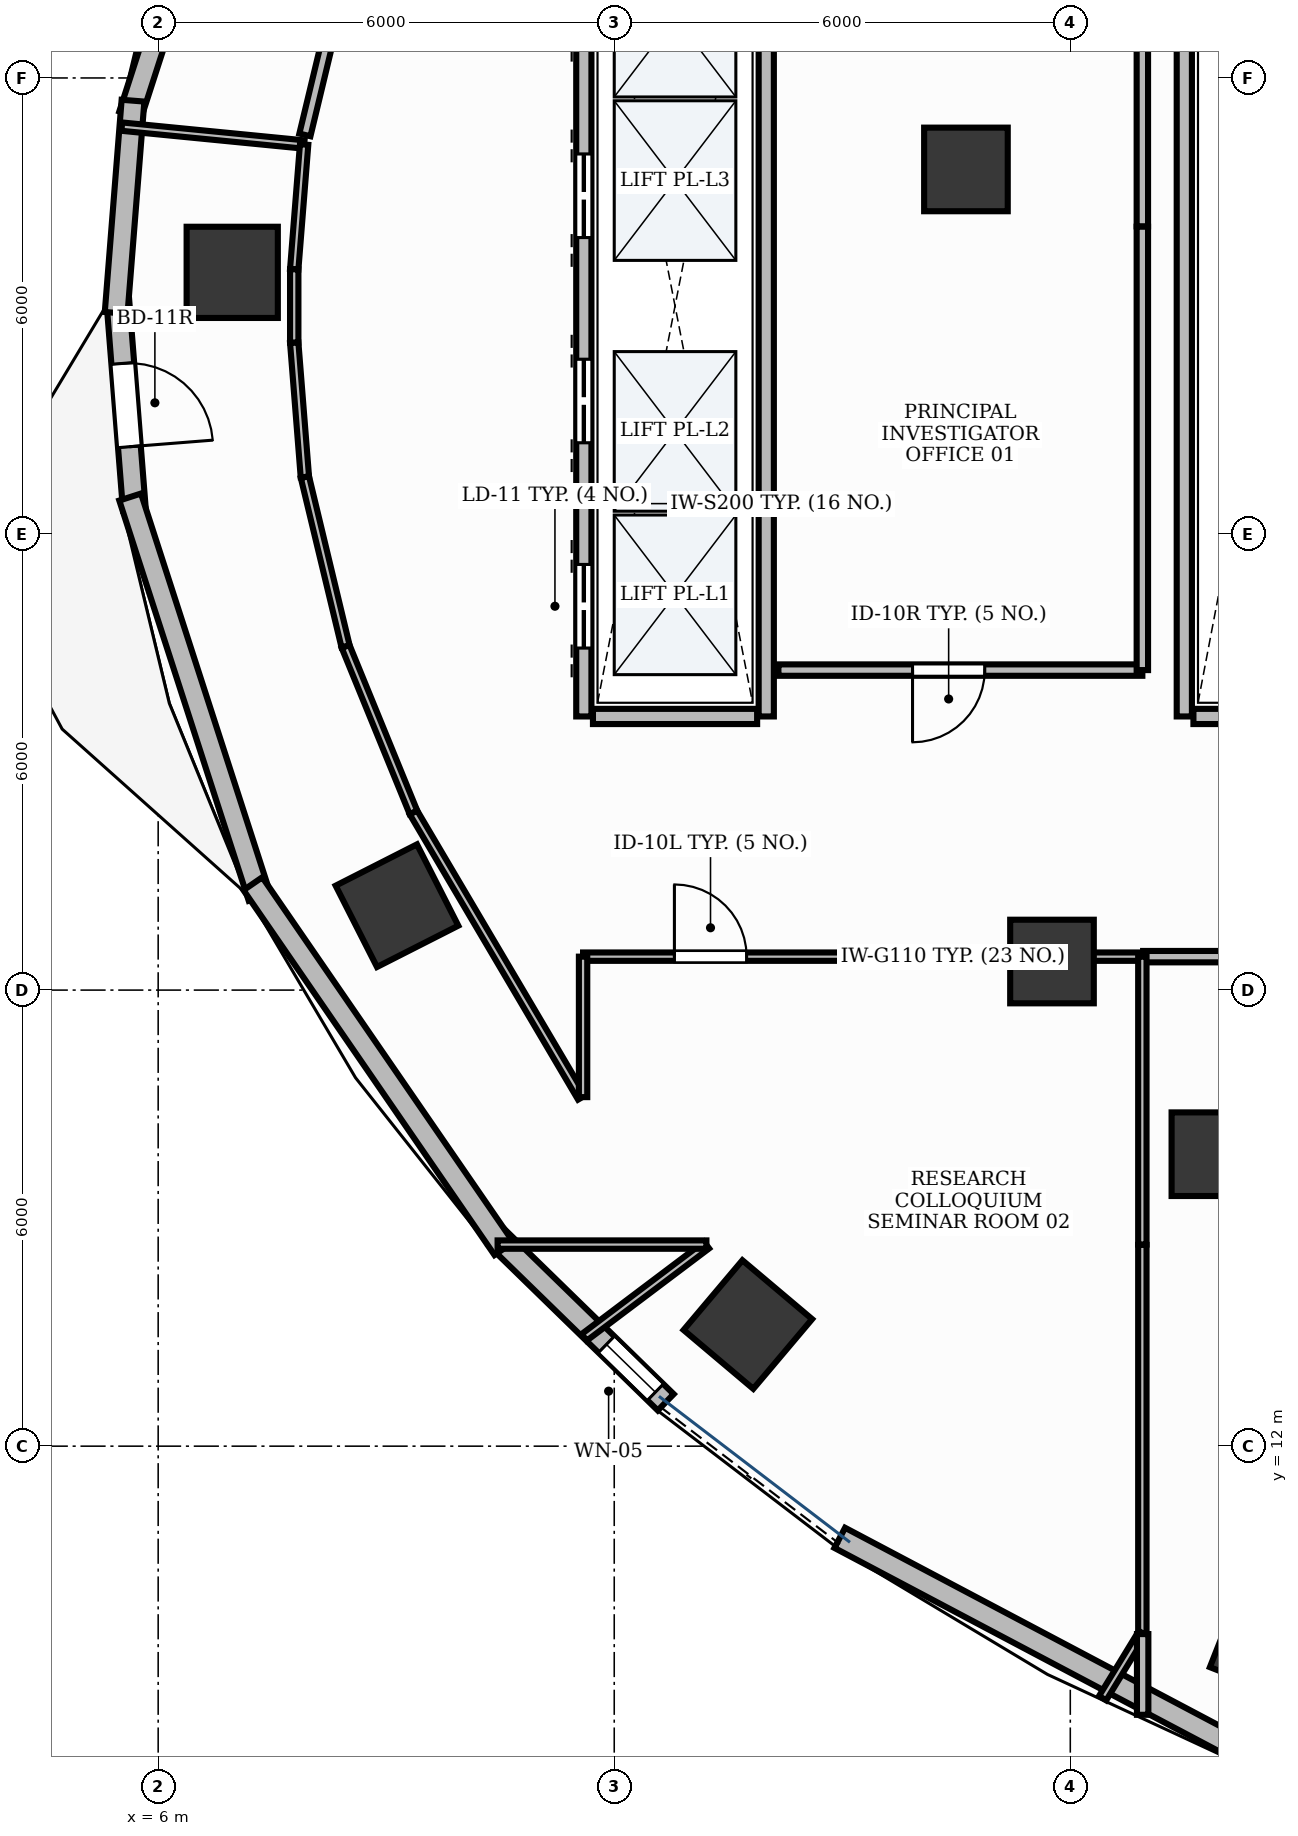
"""IFC4 building model, lengths in metres.
Left out: names, types, materials, properties, quantities, classifications, styles, units other than length and angle.
Written with IfcOpenShell. Run it as: python <this file> out.ifc"""

import sys

from ifc_helpers import new_model, si_unit, direction, frame, frame_2d, origin, origin_2d, place, context, subcontext, project, spatial, rectangle, extrude, element, fill, save


model = new_model("IFC4")
c1 = context("Model", 3, precision=1e-05, world=origin(), true_north=direction((0.0, 1.0)))
c2 = subcontext(c1, "Body", "Model", "MODEL_VIEW")
j1 = project(units=[si_unit("LENGTHUNIT", "METRE"), si_unit("PLANEANGLEUNIT", "RADIAN")], contexts=[c1])
p1 = place(None, origin())
s1 = spatial("IfcSite", under=j1, at=p1, CompositionType="ELEMENT")
p2 = place(p1, origin())
s2 = spatial("IfcBuilding", under=s1, at=p2, CompositionType="ELEMENT")
p3 = place(p2, frame((0.0, 0.0, 140.4)))
s3 = spatial("IfcBuildingStorey", under=s2, at=p3, CompositionType="ELEMENT", Elevation=140.4)
p4 = place(p3, frame((6.974, 27.442, -0.0), z_axis=(0.0, 0.0, 1.0), x_axis=(0.0, 1.0, 0.0)))
e1 = element("IfcColumn", 1, at=p4, inside=s3, PredefinedType="COLUMN", context=c2, shape_type="SweptSolid", body=[
    extrude(rectangle(XDim=1.2, YDim=1.2, at=origin_2d()), origin(), (0.0, 0.0, 1.0), 3.901),
])
p5 = place(p3, frame((16.627, 28.797, -0.0), z_axis=(0.0, 0.0, 1.0), x_axis=(1.0, 0.0, 0.0)))
e2 = element("IfcColumn", 2, at=p5, inside=s3, PredefinedType="COLUMN", context=c2, shape_type="SweptSolid", body=[
    extrude(rectangle(XDim=1.1, YDim=1.1, at=origin_2d()), origin(), (0.0, 0.0, 1.0), 3.901),
])
p6 = place(p3, frame((9.142, 19.111, -0.0), z_axis=(0.0, 0.0, 1.0), x_axis=(-0.453057191132, 0.891481453292, 0.0)))
e3 = element("IfcColumn", 3, at=p6, inside=s3, PredefinedType="COLUMN", context=c2, shape_type="SweptSolid", body=[
    extrude(rectangle(XDim=1.2, YDim=1.2, at=origin_2d()), origin(), (0.0, 0.0, 1.0), 3.901),
])
p7 = place(p3, frame((17.759, 18.376, -0.0), z_axis=(0.0, 0.0, 1.0), x_axis=(1.0, 0.0, 0.0)))
e4 = element("IfcColumn", 4, at=p7, inside=s3, PredefinedType="COLUMN", context=c2, shape_type="SweptSolid", body=[
    extrude(rectangle(XDim=1.1, YDim=1.1, at=origin_2d()), origin(), (0.0, 0.0, 1.0), 3.901),
])
p8 = place(p3, frame((13.758, 13.6, -0.0), z_axis=(0.0, 0.0, 1.0), x_axis=(-0.764246456939, 0.644924300253, 0.0)))
e5 = element("IfcColumn", 5, at=p8, inside=s3, PredefinedType="COLUMN", context=c2, shape_type="SweptSolid", body=[
    extrude(rectangle(XDim=1.2, YDim=1.2, at=origin_2d()), origin(), (0.0, 0.0, 1.0), 3.901),
])
p9 = place(p3, frame((19.883, 15.841, -0.0), z_axis=(0.0, 0.0, 1.0), x_axis=(1.0, 0.0, 0.0)))
e6 = element("IfcColumn", 6, at=p9, inside=s3, PredefinedType="COLUMN", context=c2, shape_type="SweptSolid", body=[
    extrude(rectangle(XDim=1.1, YDim=1.1, at=origin_2d()), origin(), (0.0, 0.0, 1.0), 3.901),
])
p10 = place(p3, frame((20.615, 9.431, -0.0), z_axis=(0.0, 0.0, 1.0), x_axis=(-0.930225540858, 0.366988341962, 0.0)))
e7 = element("IfcColumn", 7, at=p10, inside=s3, PredefinedType="COLUMN", context=c2, shape_type="SweptSolid", body=[
    extrude(rectangle(XDim=1.2, YDim=1.2, at=origin_2d()), origin(), (0.0, 0.0, 1.0), 3.901),
])
p11 = place(p3, frame((5.469, 27.073, 0.0), z_axis=(0.0, 0.0, 1.0), x_axis=(0.079056321743, -0.996870151019, 0.0)))
e8 = element("IfcWall", 8, at=p11, inside=s3, PredefinedType="STANDARD", context=c2, shape_type="SweptSolid", body=[
    extrude(rectangle(XDim=2.761, YDim=0.3, at=frame_2d((1.38, 0.0))), origin(), (0.0, 0.0, 1.0), 3.9),
])
p12 = place(p11, frame((0.83, 0.0, 0.0)))
e9 = element("IfcOpeningElement", 9, at=p12, cuts=e8, PredefinedType="OPENING", context=c2, shape_type="SweptSolid", body=[
    extrude(rectangle(XDim=1.1, YDim=2.15, at=frame_2d((0.55, 1.075))), frame((0.0, 0.165, 0.0), z_axis=(0.0, -1.0, 0.0), x_axis=(1.0, 0.0, 0.0)), (0.0, 0.0, 1.0), 0.33),
])
p13 = place(p3, frame((10.456, 14.743, 0.0), z_axis=(0.0, 0.0, 1.0), x_axis=(0.716099460419, -0.697998254144, 0.0)))
e10 = element("IfcWall", 10, at=p13, inside=s3, PredefinedType="STANDARD", context=c2, shape_type="SweptSolid", body=[
    extrude(rectangle(XDim=3.102, YDim=0.3, at=frame_2d((1.551, 0.0))), origin(), (0.0, 0.0, 1.0), 3.9),
])
p14 = place(p13, frame((2.012, 0.0, 0.95)))
e11 = element("IfcOpeningElement", 11, at=p14, cuts=e10, PredefinedType="OPENING", context=c2, shape_type="SweptSolid", body=[
    extrude(rectangle(XDim=0.9, YDim=1.8, at=frame_2d((0.45, 0.9))), frame((0.0, 0.165, 0.0), z_axis=(0.0, -1.0, 0.0), x_axis=(1.0, 0.0, 0.0)), (0.0, 0.0, 1.0), 0.33),
])
p15 = place(p3, frame((7.334, 34.779, 0.0), z_axis=(0.0, 0.0, 1.0), x_axis=(-0.307599470659, -0.951515930319, 0.0)))
e12 = element("IfcWall", 12, at=p15, inside=s3, PredefinedType="STANDARD", context=c2, shape_type="SweptSolid", body=[
    extrude(rectangle(XDim=5.534, YDim=0.3, at=frame_2d((2.767, 0.0))), origin(), (0.0, 0.0, 1.0), 3.47),
])
p16 = place(p3, frame((5.669, 29.701, 0.0), z_axis=(0.0, 0.0, 1.0), x_axis=(-0.079062676622, -0.996869647028, 0.0)))
e13 = element("IfcWall", 13, at=p16, inside=s3, PredefinedType="STANDARD", context=c2, shape_type="SweptSolid", body=[
    extrude(rectangle(XDim=2.801, YDim=0.3, at=frame_2d((1.4, 0.0))), origin(), (0.0, 0.0, 1.0), 3.47),
])
p17 = place(p3, frame((5.632, 24.487, 0.0), z_axis=(0.0, 0.0, 1.0), x_axis=(0.307599470659, -0.951515930319, 0.0)))
e14 = element("IfcWall", 14, at=p17, inside=s3, PredefinedType="STANDARD", context=c2, shape_type="SweptSolid", body=[
    extrude(rectangle(XDim=5.534, YDim=0.3, at=frame_2d((2.767, 0.0))), origin(), (0.0, 0.0, 1.0), 3.9),
])
p18 = place(p3, frame((7.246, 19.399, 0.0), z_axis=(0.0, 0.0, 1.0), x_axis=(0.566825798999, -0.823837674296, 0.0)))
e15 = element("IfcWall", 15, at=p18, inside=s3, PredefinedType="STANDARD", context=c2, shape_type="SweptSolid", body=[
    extrude(rectangle(XDim=5.826, YDim=0.3, at=frame_2d((2.913, 0.0))), origin(), (0.0, 0.0, 1.0), 3.9),
])
p19 = place(p3, frame((14.967, 10.794, 0.0), z_axis=(0.0, 0.0, 1.0), x_axis=(0.883986649445, -0.467512142734, 0.0)))
e16 = element("IfcWall", 16, at=p19, inside=s3, PredefinedType="STANDARD", context=c2, shape_type="SweptSolid", body=[
    extrude(rectangle(XDim=6.601, YDim=0.3, at=frame_2d((3.301, 0.0))), origin(), (0.0, 0.0, 1.0), 3.9),
])
p20 = place(p3, frame((11.6, 21.6, 0.0), z_axis=(0.0, 0.0, 1.0), x_axis=(0.0, 1.0, 0.0)))
e17 = element("IfcWall", 17, at=p20, inside=s3, PredefinedType="PARTITIONING", context=c2, shape_type="SweptSolid", body=[
    extrude(rectangle(XDim=10.8, YDim=0.2, at=frame_2d((5.4, 0.0))), origin(), (0.0, 0.0, 1.0), 2.91),
])
p21 = place(p20, frame((0.9, 0.0, 0.0)))
e18 = element("IfcOpeningElement", 18, at=p21, cuts=e17, PredefinedType="OPENING", context=c2, shape_type="SweptSolid", body=[
    extrude(rectangle(XDim=1.1, YDim=2.2, at=frame_2d((0.55, 1.1))), frame((0.0, 0.115, 0.0), z_axis=(0.0, -1.0, 0.0), x_axis=(1.0, 0.0, 0.0)), (0.0, 0.0, 1.0), 0.23),
])
p22 = place(p20, frame((3.6, 0.0, 0.0)))
e19 = element("IfcOpeningElement", 19, at=p22, cuts=e17, PredefinedType="OPENING", context=c2, shape_type="SweptSolid", body=[
    extrude(rectangle(XDim=1.1, YDim=2.2, at=frame_2d((0.55, 1.1))), frame((0.0, 0.115, 0.0), z_axis=(0.0, -1.0, 0.0), x_axis=(1.0, 0.0, 0.0)), (0.0, 0.0, 1.0), 0.23),
])
p23 = place(p20, frame((6.3, 0.0, 0.0)))
e20 = element("IfcOpeningElement", 20, at=p23, cuts=e17, PredefinedType="OPENING", context=c2, shape_type="SweptSolid", body=[
    extrude(rectangle(XDim=1.1, YDim=2.2, at=frame_2d((0.55, 1.1))), frame((0.0, 0.115, 0.0), z_axis=(0.0, -1.0, 0.0), x_axis=(1.0, 0.0, 0.0)), (0.0, 0.0, 1.0), 0.23),
])
p24 = place(p20, frame((9.0, 0.0, 0.0)))
e21 = element("IfcOpeningElement", 21, at=p24, cuts=e17, PredefinedType="OPENING", context=c2, shape_type="SweptSolid", body=[
    extrude(rectangle(XDim=1.1, YDim=2.2, at=frame_2d((0.55, 1.1))), frame((0.0, 0.115, 0.0), z_axis=(0.0, -1.0, 0.0), x_axis=(1.0, 0.0, 0.0)), (0.0, 0.0, 1.0), 0.23),
])
p25 = place(p3, frame((14.0, 21.6, 0.0), z_axis=(0.0, 0.0, 1.0), x_axis=(0.0, 1.0, 0.0)))
e22 = element("IfcWall", 22, at=p25, inside=s3, PredefinedType="PARTITIONING", context=c2, shape_type="SweptSolid", body=[
    extrude(rectangle(XDim=10.8, YDim=0.2, at=frame_2d((5.4, 0.0))), origin(), (0.0, 0.0, 1.0), 2.91),
])
p26 = place(p3, frame((11.72, 21.6, 0.0), z_axis=(0.0, 0.0, 1.0), x_axis=(1.0, 0.0, 0.0)))
e23 = element("IfcWall", 23, at=p26, inside=s3, PredefinedType="PARTITIONING", context=c2, shape_type="SweptSolid", body=[
    extrude(rectangle(XDim=2.16, YDim=0.2, at=frame_2d((1.08, 0.0))), origin(), (0.0, 0.0, 1.0), 2.91),
])
p27 = place(p3, frame((19.5, 21.6, 0.0), z_axis=(0.0, 0.0, 1.0), x_axis=(0.0, 1.0, 0.0)))
e24 = element("IfcWall", 24, at=p27, inside=s3, PredefinedType="PARTITIONING", context=c2, shape_type="SweptSolid", body=[
    extrude(rectangle(XDim=10.8, YDim=0.2, at=frame_2d((5.4, 0.0))), origin(), (0.0, 0.0, 1.0), 2.91),
])
p28 = place(p3, frame((19.62, 21.6, 0.0), z_axis=(0.0, 0.0, 1.0), x_axis=(1.0, 0.0, 0.0)))
e25 = element("IfcWall", 25, at=p28, inside=s3, PredefinedType="PARTITIONING", context=c2, shape_type="SweptSolid", body=[
    extrude(rectangle(XDim=2.11, YDim=0.2, at=frame_2d((1.055, 0.0))), origin(), (0.0, 0.0, 1.0), 2.91),
])
p29 = place(p3, frame((18.948, 22.21, 0.0), z_axis=(0.0, 0.0, 1.0), x_axis=(-1.0, 0.0, 0.0)))
e26 = element("IfcWall", 26, at=p29, inside=s3, PredefinedType="PARTITIONING", context=c2, shape_type="SweptSolid", body=[
    extrude(rectangle(XDim=4.788, YDim=0.15, at=frame_2d((2.394, 0.0))), origin(), (0.0, 0.0, 1.0), 2.91),
])
p30 = place(p29, frame((2.073, 0.0, 0.0)))
e27 = element("IfcOpeningElement", 27, at=p30, cuts=e26, PredefinedType="OPENING", context=c2, shape_type="SweptSolid", body=[
    extrude(rectangle(XDim=0.95, YDim=2.15, at=frame_2d((0.475, 1.075))), frame((0.0, 0.09, 0.0), z_axis=(0.0, -1.0, 0.0), x_axis=(1.0, 0.0, 0.0)), (0.0, 0.0, 1.0), 0.18),
])
p31 = place(p3, frame((11.59, 18.44, 0.0), z_axis=(0.0, 0.0, 1.0), x_axis=(1.0, 0.0, 0.0)))
e28 = element("IfcWall", 28, at=p31, inside=s3, PredefinedType="MOVABLE", context=c2, shape_type="SweptSolid", body=[
    extrude(rectangle(XDim=7.358, YDim=0.11, at=frame_2d((3.679, 0.0))), origin(), (0.0, 0.0, 1.0), 2.91),
])
p32 = place(p31, frame((1.202, 0.0, 0.0)))
e29 = element("IfcOpeningElement", 29, at=p32, cuts=e28, PredefinedType="OPENING", context=c2, shape_type="SweptSolid", body=[
    extrude(rectangle(XDim=0.95, YDim=2.15, at=frame_2d((0.475, 1.075))), frame((0.0, 0.07, 0.0), z_axis=(0.0, -1.0, 0.0), x_axis=(1.0, 0.0, 0.0)), (0.0, 0.0, 1.0), 0.14),
])
p33 = place(p3, frame((18.958, 18.44, 0.0), z_axis=(0.0, 0.0, 1.0), x_axis=(1.0, 0.0, 0.0)))
e30 = element("IfcWall", 30, at=p33, inside=s3, PredefinedType="PARTITIONING", context=c2, shape_type="SweptSolid", body=[
    extrude(rectangle(XDim=4.532, YDim=0.15, at=frame_2d((2.266, 0.0))), origin(), (0.0, 0.0, 1.0), 2.91),
])
p34 = place(p33, frame((1.672, 0.0, 0.0)))
e31 = element("IfcOpeningElement", 31, at=p34, cuts=e30, PredefinedType="OPENING", context=c2, shape_type="SweptSolid", body=[
    extrude(rectangle(XDim=0.95, YDim=2.15, at=frame_2d((0.475, 1.075))), frame((0.0, 0.09, 0.0), z_axis=(0.0, -1.0, 0.0), x_axis=(1.0, 0.0, 0.0)), (0.0, 0.0, 1.0), 0.18),
])
p35 = place(p3, frame((18.948, 30.848, 0.0), z_axis=(0.0, 0.0, 1.0), x_axis=(0.0, -1.0, 0.0)))
e32 = element("IfcWall", 32, at=p35, inside=s3, PredefinedType="PARTITIONING", context=c2, shape_type="SweptSolid", body=[
    extrude(rectangle(XDim=2.801, YDim=0.15, at=frame_2d((1.4, 0.0))), origin(), (0.0, 0.0, 1.0), 2.91),
])
p36 = place(p3, frame((18.948, 28.043, 0.0), z_axis=(0.0, 0.0, 1.0), x_axis=(0.0, -1.0, 0.0)))
e33 = element("IfcWall", 33, at=p36, inside=s3, PredefinedType="PARTITIONING", context=c2, shape_type="SweptSolid", body=[
    extrude(rectangle(XDim=5.833, YDim=0.15, at=frame_2d((2.917, 0.0))), origin(), (0.0, 0.0, 1.0), 2.91),
])
p37 = place(p3, frame((5.521, 29.36, 0.0), z_axis=(0.0, 0.0, 1.0), x_axis=(0.99523083929, -0.097547816614, 0.0)))
e34 = element("IfcWall", 34, at=p37, inside=s3, PredefinedType="MOVABLE", context=c2, shape_type="SweptSolid", body=[
    extrude(rectangle(XDim=2.41, YDim=0.11, at=frame_2d((1.205, 0.0))), origin(), (0.0, 0.0, 1.0), 2.91),
])
p38 = place(p3, frame((7.92, 29.125, 0.0), z_axis=(0.0, 0.0, 1.0), x_axis=(-0.079067162534, -0.996869291236, 0.0)))
e35 = element("IfcWall", 35, at=p38, inside=s3, PredefinedType="MOVABLE", context=c2, shape_type="SweptSolid", body=[
    extrude(rectangle(XDim=1.646, YDim=0.11, at=frame_2d((0.823, 0.0))), origin(), (0.0, 0.0, 1.0), 2.91),
])
p39 = place(p3, frame((7.79, 27.483, 0.0), z_axis=(0.0, 0.0, 1.0), x_axis=(0.0, -1.0, 0.0)))
e36 = element("IfcWall", 36, at=p39, inside=s3, PredefinedType="MOVABLE", context=c2, shape_type="SweptSolid", body=[
    extrude(rectangle(XDim=0.966, YDim=0.11, at=frame_2d((0.483, 0.0))), origin(), (0.0, 0.0, 1.0), 2.91),
])
p40 = place(p3, frame((7.79, 26.516, 0.0), z_axis=(0.0, 0.0, 1.0), x_axis=(0.079131522864, -0.996864184375, 0.0)))
e37 = element("IfcWall", 37, at=p40, inside=s3, PredefinedType="MOVABLE", context=c2, shape_type="SweptSolid", body=[
    extrude(rectangle(XDim=1.771, YDim=0.11, at=frame_2d((0.885, 0.0))), origin(), (0.0, 0.0, 1.0), 2.91),
])
p41 = place(p3, frame((7.93, 24.749, 0.0), z_axis=(0.0, 0.0, 1.0), x_axis=(0.233675196412, -0.972314713754, 0.0)))
e38 = element("IfcWall", 38, at=p41, inside=s3, PredefinedType="MOVABLE", context=c2, shape_type="SweptSolid", body=[
    extrude(rectangle(XDim=2.291, YDim=0.11, at=frame_2d((1.146, 0.0))), origin(), (0.0, 0.0, 1.0), 2.91),
])
p42 = place(p3, frame((8.466, 22.52, 0.0), z_axis=(0.0, 0.0, 1.0), x_axis=(0.378306283753, -0.925680482495, 0.0)))
e39 = element("IfcWall", 39, at=p42, inside=s3, PredefinedType="MOVABLE", context=c2, shape_type="SweptSolid", body=[
    extrude(rectangle(XDim=2.358, YDim=0.11, at=frame_2d((1.179, 0.0))), origin(), (0.0, 0.0, 1.0), 2.91),
])
p43 = place(p3, frame((9.359, 20.336, 0.0), z_axis=(0.0, 0.0, 1.0), x_axis=(0.508164254342, -0.86126017591, 0.0)))
e40 = element("IfcWall", 40, at=p43, inside=s3, PredefinedType="MOVABLE", context=c2, shape_type="SweptSolid", body=[
    extrude(rectangle(XDim=4.353, YDim=0.11, at=frame_2d((2.177, 0.0))), origin(), (0.0, 0.0, 1.0), 2.91),
])
p44 = place(p3, frame((11.59, 16.592, 0.0), z_axis=(0.0, 0.0, 1.0), x_axis=(0.0, 1.0, 0.0)))
e41 = element("IfcWall", 41, at=p44, inside=s3, PredefinedType="MOVABLE", context=c2, shape_type="SweptSolid", body=[
    extrude(rectangle(XDim=1.848, YDim=0.11, at=frame_2d((0.924, 0.0))), origin(), (0.0, 0.0, 1.0), 2.91),
])
p45 = place(p3, frame((18.948, 18.44, 0.0), z_axis=(0.0, 0.0, 1.0), x_axis=(0.0, -1.0, 0.0)))
e42 = element("IfcWall", 42, at=p45, inside=s3, PredefinedType="MOVABLE", context=c2, shape_type="SweptSolid", body=[
    extrude(rectangle(XDim=3.788, YDim=0.11, at=frame_2d((1.894, 0.0))), origin(), (0.0, 0.0, 1.0), 2.91),
])
p46 = place(p3, frame((18.948, 14.648, 0.0), z_axis=(0.0, 0.0, 1.0), x_axis=(0.0, -1.0, 0.0)))
e43 = element("IfcWall", 43, at=p46, inside=s3, PredefinedType="MOVABLE", context=c2, shape_type="SweptSolid", body=[
    extrude(rectangle(XDim=5.107, YDim=0.11, at=frame_2d((2.554, 0.0))), origin(), (0.0, 0.0, 1.0), 2.91),
])
p47 = place(p3, frame((18.948, 9.54, 0.0), z_axis=(0.0, 0.0, 1.0), x_axis=(-0.520996942726, -0.853558542615, 0.0)))
e44 = element("IfcWall", 44, at=p47, inside=s3, PredefinedType="MOVABLE", context=c2, shape_type="SweptSolid", body=[
    extrude(rectangle(XDim=1.003, YDim=0.11, at=frame_2d((0.501, 0.0))), origin(), (0.0, 0.0, 1.0), 2.91),
])
p48 = place(p3, frame((11.605, 13.432, 0.0), z_axis=(0.0, 0.0, 1.0), x_axis=(0.798631749936, 0.601820012956, 0.0)))
e45 = element("IfcWall", 45, at=p48, inside=s3, PredefinedType="MOVABLE", context=c2, shape_type="SweptSolid", body=[
    extrude(rectangle(XDim=2.016, YDim=0.11, at=frame_2d((1.008, 0.0))), origin(), (0.0, 0.0, 1.0), 2.91),
])
p49 = place(p3, frame((13.213, 14.652, 0.0), z_axis=(0.0, 0.0, 1.0), x_axis=(-1.0, 0.0, 0.0)))
e46 = element("IfcWall", 46, at=p49, inside=s3, PredefinedType="MOVABLE", context=c2, shape_type="SweptSolid", body=[
    extrude(rectangle(XDim=2.747, YDim=0.11, at=frame_2d((1.374, 0.0))), origin(), (0.0, 0.0, 1.0), 2.91),
])
p50 = place(p3, frame((18.952, 8.466, 0.0), z_axis=(0.0, 0.0, 1.0), x_axis=(0.0, 1.0, 0.0)))
e47 = element("IfcWall", 47, at=p50, inside=s3, PredefinedType="PARTITIONING", context=c2, shape_type="SweptSolid", body=[
    extrude(rectangle(XDim=1.062, YDim=0.15, at=frame_2d((0.531, 0.0))), origin(), (0.0, 0.0, 1.0), 2.91),
])
p51 = place(p3, frame((8.466, 31.479, 0.0), z_axis=(0.0, 0.0, 1.0), x_axis=(-0.233675196412, -0.972314713754, 0.0)))
e48 = element("IfcWall", 48, at=p51, inside=s3, PredefinedType="PARTITIONING", context=c2, shape_type="SweptSolid", body=[
    extrude(rectangle(XDim=2.291, YDim=0.15, at=frame_2d((1.146, 0.0))), origin(), (0.0, 0.0, 1.0), 2.91),
])
p52 = place(p12, origin())
e49 = element("IfcDoor", 49, at=p52, inside=s3, OperationType="SINGLE_SWING_RIGHT", PredefinedType="DOOR", context=c2, shape_type="SweptSolid", body=[
    extrude(rectangle(XDim=1.1, YDim=2.15, at=frame_2d((0.55, 1.075))), frame((0.0, 0.025, 0.0), z_axis=(0.0, -1.0, 0.0), x_axis=(1.0, 0.0, 0.0)), (0.0, 0.0, 1.0), 0.05),
])
fill(e9, e49)
p53 = place(p14, origin())
e50 = element("IfcWindow", 50, at=p53, inside=s3, PartitioningType="SINGLE_PANEL", PredefinedType="WINDOW", context=c2, shape_type="SweptSolid", body=[
    extrude(rectangle(XDim=0.9, YDim=1.8, at=frame_2d((0.45, 0.9))), frame((0.0, 0.03, 0.0), z_axis=(0.0, -1.0, 0.0), x_axis=(1.0, 0.0, 0.0)), (0.0, 0.0, 1.0), 0.06),
])
fill(e11, e50)
p54 = place(p21, origin())
e51 = element("IfcDoor", 51, at=p54, inside=s3, OperationType="DOUBLE_DOOR_SLIDING", PredefinedType="DOOR", context=c2, shape_type="SweptSolid", body=[
    extrude(rectangle(XDim=1.1, YDim=2.2, at=frame_2d((0.55, 1.1))), frame((0.0, 0.025, 0.0), z_axis=(0.0, -1.0, 0.0), x_axis=(1.0, 0.0, 0.0)), (0.0, 0.0, 1.0), 0.05),
])
fill(e18, e51)
p55 = place(p22, origin())
e52 = element("IfcDoor", 52, at=p55, inside=s3, OperationType="DOUBLE_DOOR_SLIDING", PredefinedType="DOOR", context=c2, shape_type="SweptSolid", body=[
    extrude(rectangle(XDim=1.1, YDim=2.2, at=frame_2d((0.55, 1.1))), frame((0.0, 0.025, 0.0), z_axis=(0.0, -1.0, 0.0), x_axis=(1.0, 0.0, 0.0)), (0.0, 0.0, 1.0), 0.05),
])
fill(e19, e52)
p56 = place(p23, origin())
e53 = element("IfcDoor", 53, at=p56, inside=s3, OperationType="DOUBLE_DOOR_SLIDING", PredefinedType="DOOR", context=c2, shape_type="SweptSolid", body=[
    extrude(rectangle(XDim=1.1, YDim=2.2, at=frame_2d((0.55, 1.1))), frame((0.0, 0.025, 0.0), z_axis=(0.0, -1.0, 0.0), x_axis=(1.0, 0.0, 0.0)), (0.0, 0.0, 1.0), 0.05),
])
fill(e20, e53)
p57 = place(p30, origin())
e54 = element("IfcDoor", 54, at=p57, inside=s3, OperationType="SINGLE_SWING_RIGHT", PredefinedType="DOOR", context=c2, shape_type="SweptSolid", body=[
    extrude(rectangle(XDim=0.95, YDim=2.15, at=frame_2d((0.475, 1.075))), frame((0.0, 0.025, 0.0), z_axis=(0.0, -1.0, 0.0), x_axis=(1.0, 0.0, 0.0)), (0.0, 0.0, 1.0), 0.05),
])
fill(e27, e54)
p58 = place(p32, origin())
e55 = element("IfcDoor", 55, at=p58, inside=s3, OperationType="SINGLE_SWING_LEFT", PredefinedType="DOOR", context=c2, shape_type="SweptSolid", body=[
    extrude(rectangle(XDim=0.95, YDim=2.15, at=frame_2d((0.475, 1.075))), frame((0.0, 0.025, 0.0), z_axis=(0.0, -1.0, 0.0), x_axis=(1.0, 0.0, 0.0)), (0.0, 0.0, 1.0), 0.05),
])
fill(e29, e55)
save(model, sys.argv[1])
